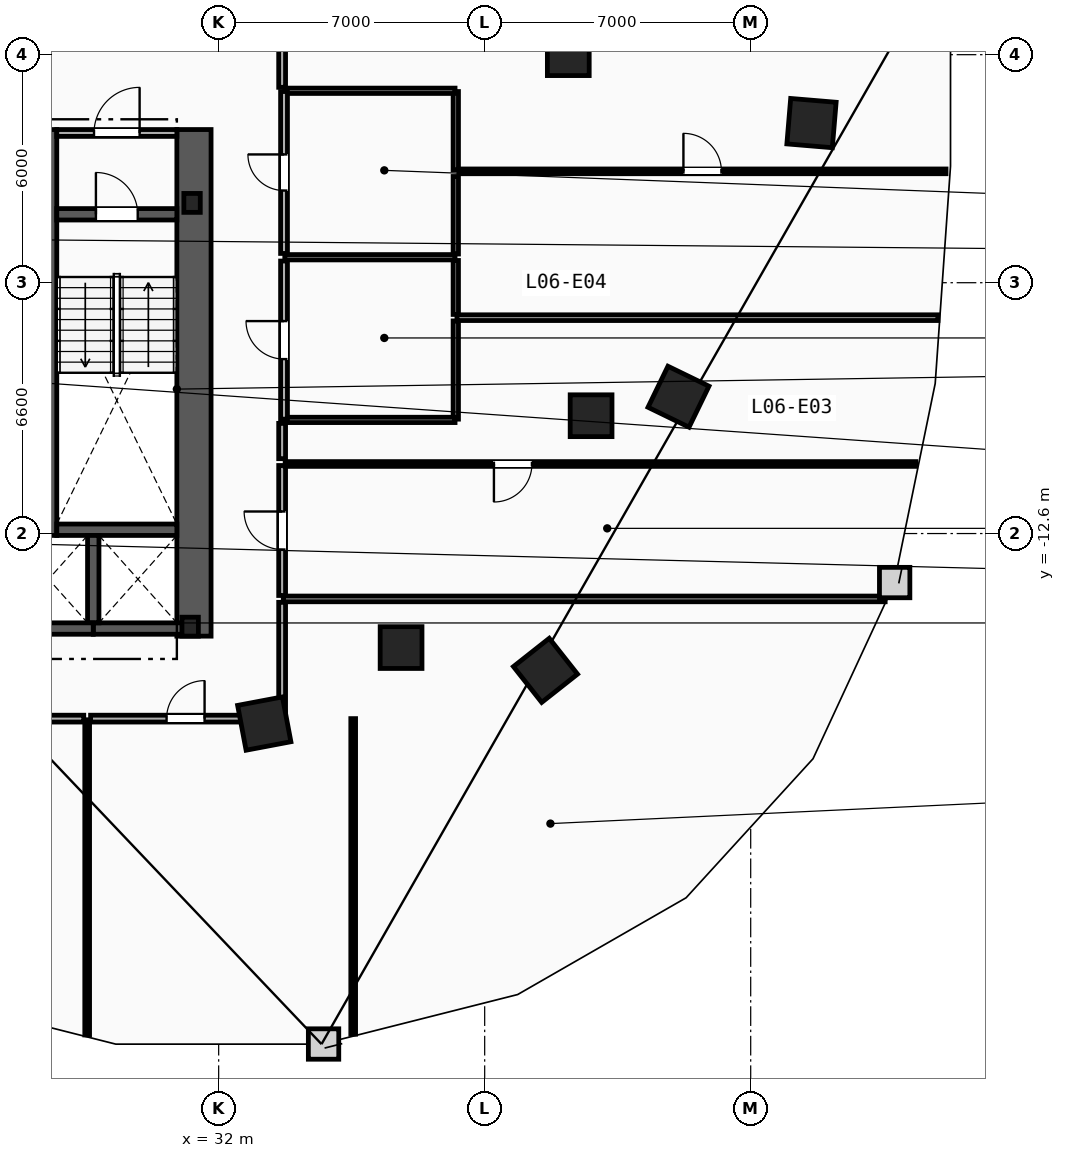
"""IFC4 building model, lengths in metres.
Left out: names, types, materials, properties, quantities, classifications, styles, units other than length and angle.
Written with IfcOpenShell. Run it as: python <this file> out.ifc"""

import sys

from ifc_helpers import new_model, si_unit, direction, frame, frame_2d, origin, origin_2d, place, context, subcontext, project, spatial, rectangle, i_section, extrude, element, fill, save


model = new_model("IFC4")
c1 = context("Model", 3, precision=1e-05, world=origin(), true_north=direction((0.0, 1.0)))
c2 = subcontext(c1, "Body", "Model", "MODEL_VIEW")
j1 = project(units=[si_unit("LENGTHUNIT", "METRE"), si_unit("PLANEANGLEUNIT", "RADIAN")], contexts=[c1])
p1 = place(None, origin())
s1 = spatial("IfcSite", under=j1, at=p1, CompositionType="ELEMENT")
p2 = place(p1, origin())
s2 = spatial("IfcBuilding", under=s1, at=p2, CompositionType="ELEMENT")
p3 = place(p2, frame((0.0, 0.0, 27.8)))
s3 = spatial("IfcBuildingStorey", under=s2, at=p3, CompositionType="ELEMENT", Elevation=27.8)
for number, where, z_axis, x_axis in (
    (1, (31.3, -3.9, 0.0), (0.0, 0.0, 1.0), (1.0, 0.0, 0.0)),
    (2, (31.25, -15.05, 0.0), (0.0, 0.0, 1.0), (1.0, 0.0, 0.0)),
):
    element("IfcColumn", number, at=place(p3, frame(where, z_axis=z_axis, x_axis=x_axis)), inside=s3, PredefinedType="COLUMN", context=c2, shape_type="SweptSolid", body=[
        extrude(i_section(OverallWidth=0.432, OverallDepth=0.498, WebThickness=0.056, FlangeThickness=0.089, FilletRadius=0.018, at=origin_2d()), origin(), (0.0, 0.0, 1.0), 3.8),
    ])
for number, where, z_axis, x_axis in (
    (3, (41.2, 0.0, 0.0), (0.0, 0.0, 1.0), (1.0, 0.0, 0.0)),
    (4, (41.8, -9.5, 0.0), (0.0, 0.0, 1.0), (1.0, 0.0, 0.0)),
    (5, (36.8, -15.6, 0.0), (0.0, 0.0, 1.0), (1.0, 0.0, 0.0)),
):
    element("IfcColumn", number, at=place(p3, frame(where, z_axis=z_axis, x_axis=x_axis)), inside=s3, PredefinedType="COLUMN", context=c2, shape_type="SweptSolid", body=[
        extrude(rectangle(XDim=1.1, YDim=1.1, at=origin_2d()), origin(), (0.0, 0.0, 1.0), 3.8),
    ])
for number, where, z_axis, x_axis in (
    (6, (33.2, -17.6, 0.0), (0.0, 0.0, 1.0), (0.983, 0.186, 0.0)),
    (7, (40.6, -16.2, 0.0), (0.0, 0.0, 1.0), (0.785, 0.619, 0.0)),
    (8, (44.1, -9.0, 0.0), (0.0, 0.0, 1.0), (0.437, 0.899, 0.0)),
    (9, (47.6, -1.8, 0.0), (0.0, 0.0, 1.0), (0.084, 0.997, 0.0)),
):
    element("IfcColumn", number, at=place(p3, frame(where, z_axis=z_axis, x_axis=x_axis)), inside=s3, PredefinedType="COLUMN", context=c2, shape_type="SweptSolid", body=[
        extrude(rectangle(XDim=1.2, YDim=1.2, at=origin_2d()), origin(), (0.0, 0.0, 1.0), 3.8),
    ])
p4 = place(p3, frame((31.35, -15.3, 0.0), z_axis=(0.0, 0.0, 1.0), x_axis=(0.0, 1.0, 0.0)))
e10 = element("IfcWall", 10, at=p4, inside=s3, PredefinedType="SHEAR", context=c2, shape_type="SweptSolid", body=[
    extrude(rectangle(XDim=13.33, YDim=0.9, at=frame_2d((6.665, 0.0))), origin(), (0.0, 0.0, 1.0), 3.5),
])
p5 = place(p3, frame((27.59, -12.65, 0.0), z_axis=(0.0, 0.0, 1.0), x_axis=(0.0, 1.0, 0.0)))
e11 = element("IfcWall", 11, at=p5, inside=s3, PredefinedType="SHEAR", context=c2, shape_type="SweptSolid", body=[
    extrude(rectangle(XDim=10.68, YDim=0.3, at=frame_2d((5.34, 0.0))), origin(), (0.0, 0.0, 1.0), 3.5),
])
p6 = place(p3, frame((27.74, -4.2, 0.0), z_axis=(0.0, 0.0, 1.0), x_axis=(1.0, 0.0, 0.0)))
e12 = element("IfcWall", 12, at=p6, inside=s3, PredefinedType="SHEAR", context=c2, shape_type="SweptSolid", body=[
    extrude(rectangle(XDim=3.16, YDim=0.3, at=frame_2d((1.58, 0.0))), origin(), (0.0, 0.0, 1.0), 3.5),
])
p7 = place(p6, frame((1.03, 0.0, 0.0)))
e13 = element("IfcOpeningElement", 13, at=p7, cuts=e12, PredefinedType="OPENING", context=c2, shape_type="SweptSolid", body=[
    extrude(rectangle(XDim=1.1, YDim=2.15, at=frame_2d((0.55, 1.075))), frame((0.0, 0.16, 0.0), z_axis=(0.0, -1.0, 0.0), x_axis=(1.0, 0.0, 0.0)), (0.0, 0.0, 1.0), 0.32),
])
p8 = place(p3, frame((27.74, -12.5, 0.0), z_axis=(0.0, 0.0, 1.0), x_axis=(1.0, 0.0, 0.0)))
e14 = element("IfcWall", 14, at=p8, inside=s3, PredefinedType="SHEAR", context=c2, shape_type="SweptSolid", body=[
    extrude(rectangle(XDim=3.16, YDim=0.3, at=frame_2d((1.58, 0.0))), origin(), (0.0, 0.0, 1.0), 3.5),
])
p9 = place(p3, frame((27.74, -2.06, 0.0), z_axis=(0.0, 0.0, 1.0), x_axis=(1.0, 0.0, 0.0)))
e15 = element("IfcWall", 15, at=p9, inside=s3, PredefinedType="PARTITIONING", context=c2, shape_type="SweptSolid", body=[
    extrude(rectangle(XDim=3.16, YDim=0.18, at=frame_2d((1.58, 0.0))), origin(), (0.0, 0.0, 1.0), 3.5),
])
p10 = place(p9, frame((0.98, 0.0, 0.0)))
e16 = element("IfcOpeningElement", 16, at=p10, cuts=e15, PredefinedType="OPENING", context=c2, shape_type="SweptSolid", body=[
    extrude(rectangle(XDim=1.2, YDim=2.15, at=frame_2d((0.6, 1.075))), frame((0.0, 0.1, 0.0), z_axis=(0.0, -1.0, 0.0), x_axis=(1.0, 0.0, 0.0)), (0.0, 0.0, 1.0), 0.2),
])
p11 = place(p3, frame((28.7, -15.1, 0.0), z_axis=(0.0, 0.0, 1.0), x_axis=(1.0, 0.0, 0.0)))
e17 = element("IfcWall", 17, at=p11, inside=s3, PredefinedType="SHEAR", context=c2, shape_type="SweptSolid", body=[
    extrude(rectangle(XDim=2.5, YDim=0.3, at=frame_2d((1.25, 0.0))), origin(), (0.0, 0.0, 1.0), 3.5),
])
p12 = place(p3, frame((28.7, -14.95, 0.0), z_axis=(0.0, 0.0, 1.0), x_axis=(0.0, 1.0, 0.0)))
e18 = element("IfcWall", 18, at=p12, inside=s3, PredefinedType="SHEAR", context=c2, shape_type="SweptSolid", body=[
    extrude(rectangle(XDim=2.3, YDim=0.3, at=frame_2d((1.15, 0.0))), origin(), (0.0, 0.0, 1.0), 3.5),
])
p13 = place(p3, frame((26.2, -15.1, 0.0), z_axis=(0.0, 0.0, 1.0), x_axis=(1.0, 0.0, 0.0)))
e19 = element("IfcWall", 19, at=p13, inside=s3, PredefinedType="SHEAR", context=c2, shape_type="SweptSolid", body=[
    extrude(rectangle(XDim=2.5, YDim=0.3, at=frame_2d((1.25, 0.0))), origin(), (0.0, 0.0, 1.0), 3.5),
])
p14 = place(p3, frame((38.24, -9.59, 0.0), z_axis=(0.0, 0.0, 1.0), x_axis=(0.0, 1.0, 0.0)))
e20 = element("IfcWall", 20, at=p14, inside=s3, PredefinedType="PARTITIONING", context=c2, shape_type="SweptSolid", body=[
    extrude(rectangle(XDim=2.585, YDim=0.14, at=frame_2d((1.292, 0.0))), origin(), (0.0, 0.0, 1.0), 3.5),
])
p15 = place(p3, frame((38.24, -6.835, 0.0), z_axis=(0.0, 0.0, 1.0), x_axis=(0.0, 1.0, 0.0)))
e21 = element("IfcWall", 21, at=p15, inside=s3, PredefinedType="PARTITIONING", context=c2, shape_type="SweptSolid", body=[
    extrude(rectangle(XDim=1.42, YDim=0.14, at=frame_2d((0.71, 0.0))), origin(), (0.0, 0.0, 1.0), 3.5),
])
p16 = place(p3, frame((38.24, -5.245, 0.0), z_axis=(0.0, 0.0, 1.0), x_axis=(0.0, 1.0, 0.0)))
e22 = element("IfcWall", 22, at=p16, inside=s3, PredefinedType="PARTITIONING", context=c2, shape_type="SweptSolid", body=[
    extrude(rectangle(XDim=2.04, YDim=0.14, at=frame_2d((1.02, 0.0))), origin(), (0.0, 0.0, 1.0), 3.5),
])
p17 = place(p3, frame((38.24, -3.035, 0.0), z_axis=(0.0, 0.0, 1.0), x_axis=(0.0, 1.0, 0.0)))
e23 = element("IfcWall", 23, at=p17, inside=s3, PredefinedType="PARTITIONING", context=c2, shape_type="SweptSolid", body=[
    extrude(rectangle(XDim=2.065, YDim=0.14, at=frame_2d((1.032, 0.0))), origin(), (0.0, 0.0, 1.0), 3.5),
])
for number, where, z_axis, x_axis in (
    (24, (33.74, -0.95, 0.0), (0.0, 0.0, 1.0), (1.0, 0.0, 0.0)),
    (25, (33.74, -5.33, 0.0), (0.0, 0.0, 1.0), (1.0, 0.0, 0.0)),
    (26, (33.74, -9.61, 0.0), (0.0, 0.0, 1.0), (1.0, 0.0, 0.0)),
):
    element("IfcWall", number, at=place(p3, frame(where, z_axis=z_axis, x_axis=x_axis)), inside=s3, PredefinedType="PARTITIONING", context=c2, shape_type="SweptSolid", body=[
        extrude(rectangle(XDim=4.48, YDim=0.14, at=frame_2d((2.24, 0.0))), origin(), (0.0, 0.0, 1.0), 3.5),
    ])
p18 = place(p3, frame((33.72, -5.23, 0.0), z_axis=(0.0, 0.0, 1.0), x_axis=(0.0, 1.0, 0.0)))
e27 = element("IfcWall", 27, at=p18, inside=s3, PredefinedType="PARTITIONING", context=c2, shape_type="SweptSolid", body=[
    extrude(rectangle(XDim=4.26, YDim=0.18, at=frame_2d((2.13, 0.0))), origin(), (0.0, 0.0, 1.0), 3.5),
])
p19 = place(p18, frame((1.655, 0.0, 0.0)))
e28 = element("IfcOpeningElement", 28, at=p19, cuts=e27, PredefinedType="OPENING", context=c2, shape_type="SweptSolid", body=[
    extrude(rectangle(XDim=0.95, YDim=2.1, at=frame_2d((0.475, 1.05))), frame((0.0, 0.1, 0.0), z_axis=(0.0, -1.0, 0.0), x_axis=(1.0, 0.0, 0.0)), (0.0, 0.0, 1.0), 0.2),
])
p20 = place(p3, frame((33.72, -9.59, 0.0), z_axis=(0.0, 0.0, 1.0), x_axis=(0.0, 1.0, 0.0)))
e29 = element("IfcWall", 29, at=p20, inside=s3, PredefinedType="PARTITIONING", context=c2, shape_type="SweptSolid", body=[
    extrude(rectangle(XDim=4.16, YDim=0.18, at=frame_2d((2.08, 0.0))), origin(), (0.0, 0.0, 1.0), 3.5),
])
p21 = place(p20, frame((1.58, 0.0, 0.0)))
e30 = element("IfcOpeningElement", 30, at=p21, cuts=e29, PredefinedType="OPENING", context=c2, shape_type="SweptSolid", body=[
    extrude(rectangle(XDim=1.0, YDim=2.15, at=frame_2d((0.5, 1.075))), frame((0.0, 0.1, 0.0), z_axis=(0.0, -1.0, 0.0), x_axis=(1.0, 0.0, 0.0)), (0.0, 0.0, 1.0), 0.2),
])
p22 = place(p3, frame((38.27, -6.92, 0.0), z_axis=(0.0, 0.0, 1.0), x_axis=(1.0, 0.0, 0.0)))
e31 = element("IfcWall", 31, at=p22, inside=s3, PredefinedType="PARTITIONING", context=c2, shape_type="SweptSolid", body=[
    extrude(rectangle(XDim=12.657, YDim=0.15, at=frame_2d((6.329, 0.0))), origin(), (0.0, 0.0, 1.0), 3.5),
])
p23 = place(p3, frame((33.7, -14.32, 0.0), z_axis=(0.0, 0.0, 1.0), x_axis=(1.0, 0.0, 0.0)))
e32 = element("IfcWall", 32, at=p23, inside=s3, PredefinedType="PARTITIONING", context=c2, shape_type="SweptSolid", body=[
    extrude(rectangle(XDim=15.838, YDim=0.15, at=frame_2d((7.919, 0.0))), origin(), (0.0, 0.0, 1.0), 3.5),
])
p24 = place(p3, frame((28.54, -25.794, 0.0), z_axis=(0.0, 0.0, 1.0), x_axis=(0.0, 1.0, 0.0)))
e33 = element("IfcWall", 33, at=p24, inside=s3, PredefinedType="PARTITIONING", context=c2, shape_type="SweptSolid", body=[
    extrude(rectangle(XDim=8.294, YDim=0.125, at=frame_2d((4.147, 0.0))), origin(), (0.0, 0.0, 1.0), 3.5),
])
p25 = place(p3, frame((35.54, -25.773, 0.0), z_axis=(0.0, 0.0, 1.0), x_axis=(0.0, 1.0, 0.0)))
e34 = element("IfcWall", 34, at=p25, inside=s3, PredefinedType="PARTITIONING", context=c2, shape_type="SweptSolid", body=[
    extrude(rectangle(XDim=8.303, YDim=0.125, at=frame_2d((4.152, 0.0))), origin(), (0.0, 0.0, 1.0), 3.5),
])
p26 = place(p3, frame((28.63, -17.47, 0.0), z_axis=(0.0, 0.0, 1.0), x_axis=(1.0, 0.0, 0.0)))
e35 = element("IfcWall", 35, at=p26, inside=s3, PredefinedType="PARTITIONING", context=c2, shape_type="SweptSolid", body=[
    extrude(rectangle(XDim=4.999, YDim=0.18, at=frame_2d((2.499, 0.0))), origin(), (0.0, 0.0, 1.0), 3.5),
])
p27 = place(p26, frame((1.999, 0.0, 0.0)))
e36 = element("IfcOpeningElement", 36, at=p27, cuts=e35, PredefinedType="OPENING", context=c2, shape_type="SweptSolid", body=[
    extrude(rectangle(XDim=1.0, YDim=2.15, at=frame_2d((0.5, 1.075))), frame((0.0, 0.1, 0.0), z_axis=(0.0, -1.0, 0.0), x_axis=(1.0, 0.0, 0.0)), (0.0, 0.0, 1.0), 0.2),
])
p28 = place(p3, frame((33.67, -17.428, 0.0), z_axis=(0.0, 0.0, 1.0), x_axis=(0.0, 1.0, 0.0)))
e37 = element("IfcWall", 37, at=p28, inside=s3, PredefinedType="PARTITIONING", context=c2, shape_type="SweptSolid", body=[
    extrude(rectangle(XDim=3.019, YDim=0.18, at=frame_2d((1.509, 0.0))), origin(), (0.0, 0.0, 1.0), 3.5),
])
p29 = place(p3, frame((33.67, -14.23, 0.0), z_axis=(0.0, 0.0, 1.0), x_axis=(0.0, 1.0, 0.0)))
e38 = element("IfcWall", 38, at=p29, inside=s3, PredefinedType="PARTITIONING", context=c2, shape_type="SweptSolid", body=[
    extrude(rectangle(XDim=3.42, YDim=0.18, at=frame_2d((1.71, 0.0))), origin(), (0.0, 0.0, 1.0), 3.5),
])
p30 = place(p29, frame((1.21, 0.0, 0.0)))
e39 = element("IfcOpeningElement", 39, at=p30, cuts=e38, PredefinedType="OPENING", context=c2, shape_type="SweptSolid", body=[
    extrude(rectangle(XDim=1.0, YDim=2.15, at=frame_2d((0.5, 1.075))), frame((0.0, 0.1, 0.0), z_axis=(0.0, -1.0, 0.0), x_axis=(1.0, 0.0, 0.0)), (0.0, 0.0, 1.0), 0.2),
])
p31 = place(p3, frame((33.67, -10.63, 0.0), z_axis=(0.0, 0.0, 1.0), x_axis=(0.0, 1.0, 0.0)))
e40 = element("IfcWall", 40, at=p31, inside=s3, PredefinedType="PARTITIONING", context=c2, shape_type="SweptSolid", body=[
    extrude(rectangle(XDim=0.928, YDim=0.18, at=frame_2d((0.464, 0.0))), origin(), (0.0, 0.0, 1.0), 3.5),
])
p32 = place(p3, frame((33.67, -0.859, 0.0), z_axis=(0.0, 0.0, 1.0), x_axis=(0.0, 1.0, 0.0)))
e41 = element("IfcWall", 41, at=p32, inside=s3, PredefinedType="PARTITIONING", context=c2, shape_type="SweptSolid", body=[
    extrude(rectangle(XDim=12.259, YDim=0.18, at=frame_2d((6.129, 0.0))), origin(), (0.0, 0.0, 1.0), 3.5),
])
p33 = place(p3, frame((16.822, -17.47, 0.0), z_axis=(0.0, 0.0, 1.0), x_axis=(1.0, 0.0, 0.0)))
e42 = element("IfcWall", 42, at=p33, inside=s3, PredefinedType="PARTITIONING", context=c2, shape_type="SweptSolid", body=[
    extrude(rectangle(XDim=11.628, YDim=0.18, at=frame_2d((5.814, 0.0))), origin(), (0.0, 0.0, 1.0), 3.5),
])
p34 = place(p3, frame((50.343, -10.77, 0.0), z_axis=(0.0, 0.0, 1.0), x_axis=(-1.0, 0.0, 0.0)))
e43 = element("IfcWall", 43, at=p34, inside=s3, PredefinedType="PARTITIONING", context=c2, shape_type="SweptSolid", body=[
    extrude(rectangle(XDim=16.593, YDim=0.125, at=frame_2d((8.296, 0.0))), origin(), (0.0, 0.0, 1.0), 3.5),
])
p35 = place(p34, frame((10.099, 0.0, 0.0)))
e44 = element("IfcOpeningElement", 44, at=p35, cuts=e43, PredefinedType="OPENING", context=c2, shape_type="SweptSolid", body=[
    extrude(rectangle(XDim=1.0, YDim=2.15, at=frame_2d((0.5, 1.075))), frame((0.0, 0.073, 0.0), z_axis=(0.0, -1.0, 0.0), x_axis=(1.0, 0.0, 0.0)), (0.0, 0.0, 1.0), 0.145),
])
p36 = place(p3, frame((38.32, -3.07, 0.0), z_axis=(0.0, 0.0, 1.0), x_axis=(1.0, 0.0, 0.0)))
e45 = element("IfcWall", 45, at=p36, inside=s3, PredefinedType="PARTITIONING", context=c2, shape_type="SweptSolid", body=[
    extrude(rectangle(XDim=12.82, YDim=0.125, at=frame_2d((6.41, 0.0))), origin(), (0.0, 0.0, 1.0), 3.5),
])
p37 = place(p36, frame((5.91, 0.0, 0.0)))
e46 = element("IfcOpeningElement", 46, at=p37, cuts=e45, PredefinedType="OPENING", context=c2, shape_type="SweptSolid", body=[
    extrude(rectangle(XDim=1.0, YDim=2.15, at=frame_2d((0.5, 1.075))), frame((0.0, 0.073, 0.0), z_axis=(0.0, -1.0, 0.0), x_axis=(1.0, 0.0, 0.0)), (0.0, 0.0, 1.0), 0.145),
])
p38 = place(p7, origin())
e47 = element("IfcDoor", 47, at=p38, inside=s3, OperationType="SINGLE_SWING_LEFT", PredefinedType="DOOR", context=c2, shape_type="SweptSolid", body=[
    extrude(rectangle(XDim=1.1, YDim=2.15, at=frame_2d((0.55, 1.075))), frame((0.0, 0.025, 0.0), z_axis=(0.0, -1.0, 0.0), x_axis=(1.0, 0.0, 0.0)), (0.0, 0.0, 1.0), 0.05),
])
fill(e13, e47)
p39 = place(p10, origin())
e48 = element("IfcDoor", 48, at=p39, inside=s3, OperationType="SINGLE_SWING_RIGHT", PredefinedType="DOOR", context=c2, shape_type="SweptSolid", body=[
    extrude(rectangle(XDim=1.2, YDim=2.15, at=frame_2d((0.6, 1.075))), frame((0.0, 0.025, 0.0), z_axis=(0.0, -1.0, 0.0), x_axis=(1.0, 0.0, 0.0)), (0.0, 0.0, 1.0), 0.05),
])
fill(e16, e48)
p40 = place(p35, origin())
e49 = element("IfcDoor", 49, at=p40, inside=s3, OperationType="SINGLE_SWING_RIGHT", PredefinedType="DOOR", context=c2, shape_type="SweptSolid", body=[
    extrude(rectangle(XDim=1.0, YDim=2.15, at=frame_2d((0.5, 1.075))), frame((0.0, 0.025, 0.0), z_axis=(0.0, -1.0, 0.0), x_axis=(1.0, 0.0, 0.0)), (0.0, 0.0, 1.0), 0.05),
])
fill(e44, e49)
p41 = place(p37, origin())
e50 = element("IfcDoor", 50, at=p41, inside=s3, OperationType="SINGLE_SWING_LEFT", PredefinedType="DOOR", context=c2, shape_type="SweptSolid", body=[
    extrude(rectangle(XDim=1.0, YDim=2.15, at=frame_2d((0.5, 1.075))), frame((0.0, 0.025, 0.0), z_axis=(0.0, -1.0, 0.0), x_axis=(1.0, 0.0, 0.0)), (0.0, 0.0, 1.0), 0.05),
])
fill(e46, e50)
p42 = place(p27, origin())
e51 = element("IfcDoor", 51, at=p42, inside=s3, OperationType="SINGLE_SWING_RIGHT", PredefinedType="DOOR", context=c2, shape_type="SweptSolid", body=[
    extrude(rectangle(XDim=1.0, YDim=2.15, at=frame_2d((0.5, 1.075))), frame((0.0, 0.025, 0.0), z_axis=(0.0, -1.0, 0.0), x_axis=(1.0, 0.0, 0.0)), (0.0, 0.0, 1.0), 0.05),
])
fill(e36, e51)
p43 = place(p19, origin())
e52 = element("IfcDoor", 52, at=p43, inside=s3, OperationType="SINGLE_SWING_RIGHT", PredefinedType="DOOR", context=c2, shape_type="SweptSolid", body=[
    extrude(rectangle(XDim=0.95, YDim=2.1, at=frame_2d((0.475, 1.05))), frame((0.0, 0.025, 0.0), z_axis=(0.0, -1.0, 0.0), x_axis=(1.0, 0.0, 0.0)), (0.0, 0.0, 1.0), 0.05),
])
fill(e28, e52)
p44 = place(p21, origin())
e53 = element("IfcDoor", 53, at=p44, inside=s3, OperationType="SINGLE_SWING_RIGHT", PredefinedType="DOOR", context=c2, shape_type="SweptSolid", body=[
    extrude(rectangle(XDim=1.0, YDim=2.15, at=frame_2d((0.5, 1.075))), frame((0.0, 0.025, 0.0), z_axis=(0.0, -1.0, 0.0), x_axis=(1.0, 0.0, 0.0)), (0.0, 0.0, 1.0), 0.05),
])
fill(e30, e53)
p45 = place(p30, origin())
e54 = element("IfcDoor", 54, at=p45, inside=s3, OperationType="SINGLE_SWING_RIGHT", PredefinedType="DOOR", context=c2, shape_type="SweptSolid", body=[
    extrude(rectangle(XDim=1.0, YDim=2.15, at=frame_2d((0.5, 1.075))), frame((0.0, 0.025, 0.0), z_axis=(0.0, -1.0, 0.0), x_axis=(1.0, 0.0, 0.0)), (0.0, 0.0, 1.0), 0.05),
])
fill(e39, e54)
save(model, sys.argv[1])
